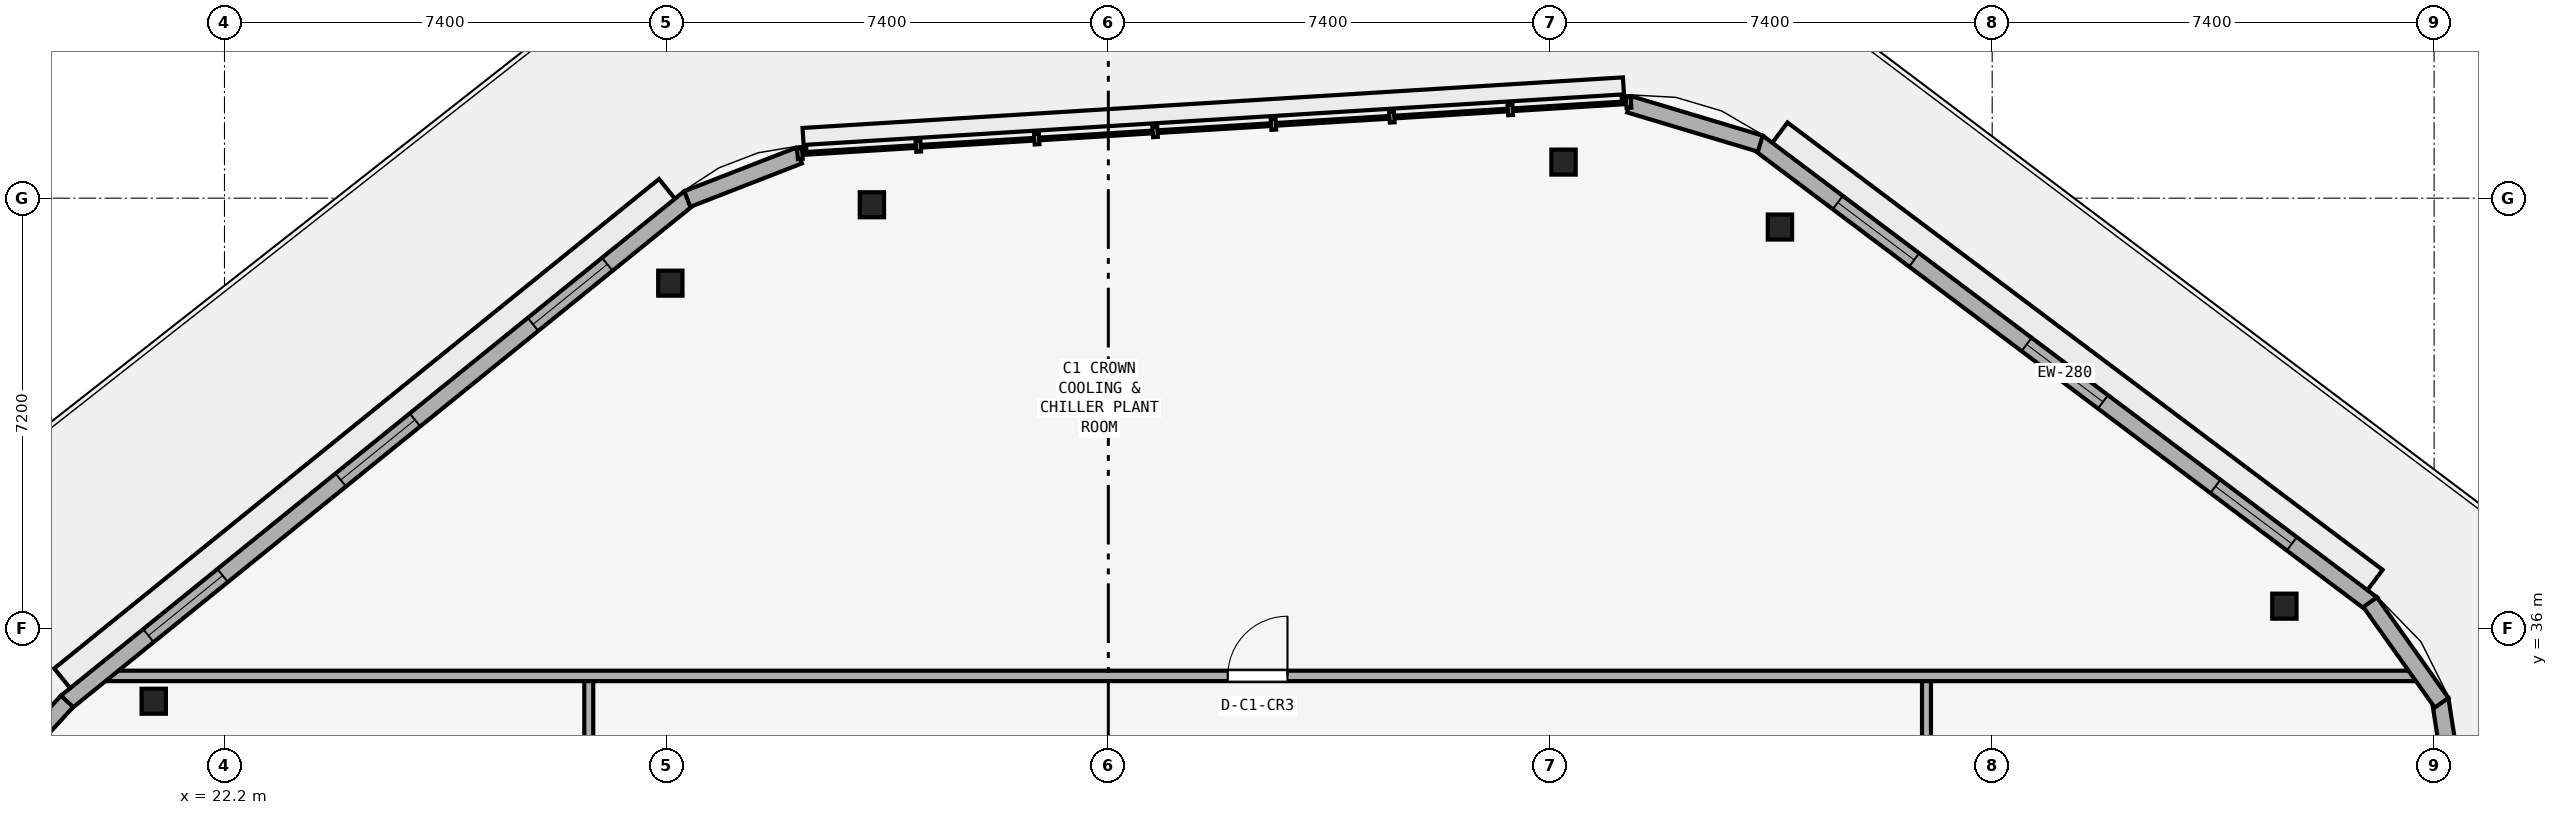
"""IFC4 building model, lengths in metres.
Left out: names, types, materials, properties, quantities, classifications, styles, units other than length and angle.
Written with IfcOpenShell. Run it as: python <this file> out.ifc"""

import sys

from ifc_helpers import new_model, si_unit, direction, frame, frame_2d, origin, origin_2d, place, context, subcontext, project, spatial, rectangle, i_section, extrude, element, fill, save


model = new_model("IFC4")
c1 = context("Model", 3, precision=1e-05, world=origin(), true_north=direction((0.0, 1.0)))
c2 = subcontext(c1, "Body", "Model", "MODEL_VIEW")
j1 = project(units=[si_unit("LENGTHUNIT", "METRE"), si_unit("PLANEANGLEUNIT", "RADIAN")], contexts=[c1])
p1 = place(None, origin())
s1 = spatial("IfcSite", under=j1, at=p1, CompositionType="ELEMENT")
p2 = place(p1, origin())
s2 = spatial("IfcBuilding", under=s1, at=p2, CompositionType="ELEMENT")
p3 = place(p2, frame((0.0, 0.0, 313.4)))
s3 = spatial("IfcBuildingStorey", under=s2, at=p3, CompositionType="ELEMENT", Elevation=313.4)
for number, where, z_axis, x_axis in (
    (1, (56.693, 36.368, 0.0), (0.0, 0.0, 1.0), (1.0, 0.0, 0.0)),
    (2, (48.246, 42.717, 0.0), (0.0, 0.0, 1.0), (1.0, 0.0, 0.0)),
    (3, (44.622, 43.804, 0.0), (0.0, 0.0, 1.0), (1.0, 0.0, 0.0)),
    (4, (33.041, 43.09, 0.0), (0.0, 0.0, 1.0), (1.0, 0.0, 0.0)),
    (5, (29.666, 41.777, 0.0), (0.0, 0.0, 1.0), (1.0, 0.0, 0.0)),
    (6, (21.016, 34.776, 0.0), (0.0, 0.0, 1.0), (1.0, 0.0, 0.0)),
):
    element("IfcColumn", number, at=place(p3, frame(where, z_axis=z_axis, x_axis=x_axis)), inside=s3, PredefinedType="COLUMN", context=c2, shape_type="SweptSolid", body=[
        extrude(i_section(OverallWidth=0.407, OverallDepth=0.419, WebThickness=0.031, FlangeThickness=0.049, at=origin_2d()), origin(), (0.0, 0.0, 1.0), 4.0),
    ])
p4 = place(p3, frame((50.7, 15.2, 0.0), z_axis=(0.0, 0.0, 1.0), x_axis=(0.0, 1.0, 0.0)))
e7 = element("IfcWall", 7, at=p4, inside=s3, PredefinedType="PARTITIONING", context=c2, shape_type="SweptSolid", body=[
    extrude(rectangle(XDim=20.0, YDim=0.15, at=frame_2d((10.0, 0.0))), origin(), (0.0, 0.0, 1.0), 3.72),
])
p5 = place(p4, frame((9.5, 0.0, 0.0)))
e8 = element("IfcOpeningElement", 8, at=p5, cuts=e7, PredefinedType="OPENING", context=c2, shape_type="SweptSolid", body=[
    extrude(rectangle(XDim=1.0, YDim=2.12, at=frame_2d((0.5, 1.06))), frame((0.0, 0.085, 0.0), z_axis=(0.0, -1.0, 0.0), x_axis=(1.0, 0.0, 0.0)), (0.0, 0.0, 1.0), 0.17),
])
p6 = place(p3, frame((28.3, 15.2, 0.0), z_axis=(0.0, 0.0, 1.0), x_axis=(0.0, 1.0, 0.0)))
e9 = element("IfcWall", 9, at=p6, inside=s3, PredefinedType="PARTITIONING", context=c2, shape_type="SweptSolid", body=[
    extrude(rectangle(XDim=20.0, YDim=0.15, at=frame_2d((10.0, 0.0))), origin(), (0.0, 0.0, 1.0), 3.72),
])
p7 = place(p6, frame((9.5, 0.0, 0.0)))
e10 = element("IfcOpeningElement", 10, at=p7, cuts=e9, PredefinedType="OPENING", context=c2, shape_type="SweptSolid", body=[
    extrude(rectangle(XDim=1.0, YDim=2.12, at=frame_2d((0.5, 1.06))), frame((0.0, 0.085, 0.0), z_axis=(0.0, -1.0, 0.0), x_axis=(1.0, 0.0, 0.0)), (0.0, 0.0, 1.0), 0.17),
])
p8 = place(p3, frame((20.01, 35.2, 0.0), z_axis=(0.0, 0.0, 1.0), x_axis=(1.0, 0.0, 0.0)))
e11 = element("IfcWall", 11, at=p8, inside=s3, PredefinedType="PARTITIONING", context=c2, shape_type="SweptSolid", body=[
    extrude(rectangle(XDim=39.04, YDim=0.175, at=frame_2d((19.52, 0.0))), origin(), (0.0, 0.0, 1.0), 3.103),
])
p9 = place(p8, frame((18.99, 0.0, 0.0)))
e12 = element("IfcOpeningElement", 12, at=p9, cuts=e11, PredefinedType="OPENING", context=c2, shape_type="SweptSolid", body=[
    extrude(rectangle(XDim=1.0, YDim=2.12, at=frame_2d((0.5, 1.06))), frame((0.0, 0.097, 0.0), z_axis=(0.0, -1.0, 0.0), x_axis=(1.0, 0.0, 0.0)), (0.0, 0.0, 1.0), 0.195),
])
p10 = place(p3, frame((58.159, 36.404, 0.0), z_axis=(0.0, 0.0, 1.0), x_axis=(-0.799362001769, 0.600849723415, 0.0)))
e13 = element("IfcWall", 13, at=p10, inside=s3, PredefinedType="STANDARD", context=c2, shape_type="SweptSolid", body=[
    extrude(rectangle(XDim=12.867, YDim=0.28, at=frame_2d((6.433, 0.0))), origin(), (0.0, 0.0, 1.0), 3.72),
])
p11 = place(p10, frame((1.678, 0.0, 0.9)))
e14 = element("IfcOpeningElement", 14, at=p11, cuts=e13, PredefinedType="OPENING", context=c2, shape_type="SweptSolid", body=[
    extrude(rectangle(XDim=1.6, YDim=1.45, at=frame_2d((0.8, 0.725))), frame((0.0, 0.15, 0.0), z_axis=(0.0, -1.0, 0.0), x_axis=(1.0, 0.0, 0.0)), (0.0, 0.0, 1.0), 0.3),
])
p12 = place(p10, frame((5.633, 0.0, 0.9)))
e15 = element("IfcOpeningElement", 15, at=p12, cuts=e13, PredefinedType="OPENING", context=c2, shape_type="SweptSolid", body=[
    extrude(rectangle(XDim=1.6, YDim=1.45, at=frame_2d((0.8, 0.725))), frame((0.0, 0.15, 0.0), z_axis=(0.0, -1.0, 0.0), x_axis=(1.0, 0.0, 0.0)), (0.0, 0.0, 1.0), 0.3),
])
p13 = place(p10, frame((9.589, 0.0, 0.9)))
e16 = element("IfcOpeningElement", 16, at=p13, cuts=e13, PredefinedType="OPENING", context=c2, shape_type="SweptSolid", body=[
    extrude(rectangle(XDim=1.6, YDim=1.45, at=frame_2d((0.8, 0.725))), frame((0.0, 0.15, 0.0), z_axis=(0.0, -1.0, 0.0), x_axis=(1.0, 0.0, 0.0)), (0.0, 0.0, 1.0), 0.3),
])
p14 = place(p3, frame((29.987, 43.208, 0.0), z_axis=(0.0, 0.0, 1.0), x_axis=(-0.777319383305, -0.629106172548, 0.0)))
e17 = element("IfcWall", 17, at=p14, inside=s3, PredefinedType="STANDARD", context=c2, shape_type="SweptSolid", body=[
    extrude(rectangle(XDim=13.428, YDim=0.28, at=frame_2d((6.714, 0.0))), origin(), (0.0, 0.0, 1.0), 3.72),
])
p15 = place(p14, frame((1.771, 0.0, 0.9)))
e18 = element("IfcOpeningElement", 18, at=p15, cuts=e17, PredefinedType="OPENING", context=c2, shape_type="SweptSolid", body=[
    extrude(rectangle(XDim=1.6, YDim=1.45, at=frame_2d((0.8, 0.725))), frame((0.0, 0.15, 0.0), z_axis=(0.0, -1.0, 0.0), x_axis=(1.0, 0.0, 0.0)), (0.0, 0.0, 1.0), 0.3),
])
p16 = place(p14, frame((5.914, 0.0, 0.9)))
e19 = element("IfcOpeningElement", 19, at=p16, cuts=e17, PredefinedType="OPENING", context=c2, shape_type="SweptSolid", body=[
    extrude(rectangle(XDim=1.6, YDim=1.45, at=frame_2d((0.8, 0.725))), frame((0.0, 0.15, 0.0), z_axis=(0.0, -1.0, 0.0), x_axis=(1.0, 0.0, 0.0)), (0.0, 0.0, 1.0), 0.3),
])
p17 = place(p14, frame((10.057, 0.0, 0.9)))
e20 = element("IfcOpeningElement", 20, at=p17, cuts=e17, PredefinedType="OPENING", context=c2, shape_type="SweptSolid", body=[
    extrude(rectangle(XDim=1.6, YDim=1.45, at=frame_2d((0.8, 0.725))), frame((0.0, 0.15, 0.0), z_axis=(0.0, -1.0, 0.0), x_axis=(1.0, 0.0, 0.0)), (0.0, 0.0, 1.0), 0.3),
])
p18 = place(p3, frame((59.452, 33.841, 0.0), z_axis=(0.0, 0.0, 1.0), x_axis=(-0.153890702538, 0.988087876493, 0.0)))
e21 = element("IfcWall", 21, at=p18, inside=s3, PredefinedType="STANDARD", context=c2, shape_type="SweptSolid", body=[
    extrude(rectangle(XDim=0.98, YDim=0.28, at=frame_2d((0.49, 0.0))), origin(), (0.0, 0.0, 1.0), 3.72),
])
p19 = place(p3, frame((59.325, 34.75, 0.0), z_axis=(0.0, 0.0, 1.0), x_axis=(-0.578944699304, 0.815366810183, 0.0)))
e22 = element("IfcWall", 22, at=p19, inside=s3, PredefinedType="STANDARD", context=c2, shape_type="SweptSolid", body=[
    extrude(rectangle(XDim=2.066, YDim=0.28, at=frame_2d((1.033, 0.0))), origin(), (0.0, 0.0, 1.0), 3.72),
])
p20 = place(p3, frame((47.917, 44.113, 0.0), z_axis=(0.0, 0.0, 1.0), x_axis=(-0.957835100655, 0.287318499149, 0.0)))
e23 = element("IfcWall", 23, at=p20, inside=s3, PredefinedType="STANDARD", context=c2, shape_type="SweptSolid", body=[
    extrude(rectangle(XDim=2.287, YDim=0.28, at=frame_2d((1.143, 0.0))), origin(), (0.0, 0.0, 1.0), 3.72),
])
p21 = place(p3, frame((31.819, 43.913, 0.0), z_axis=(0.0, 0.0, 1.0), x_axis=(-0.931977254785, -0.362516753494, 0.0)))
e24 = element("IfcWall", 24, at=p21, inside=s3, PredefinedType="STANDARD", context=c2, shape_type="SweptSolid", body=[
    extrude(rectangle(XDim=2.006, YDim=0.28, at=frame_2d((1.003, 0.0))), origin(), (0.0, 0.0, 1.0), 3.72),
])
p22 = place(p3, frame((19.564, 34.774, 0.0), z_axis=(0.0, 0.0, 1.0), x_axis=(-0.675845585144, -0.737043245028, 0.0)))
e25 = element("IfcWall", 25, at=p22, inside=s3, PredefinedType="STANDARD", context=c2, shape_type="SweptSolid", body=[
    extrude(rectangle(XDim=1.005, YDim=0.28, at=frame_2d((0.503, 0.0))), origin(), (0.0, 0.0, 1.0), 3.72),
])
p23 = place(p9, origin())
e26 = element("IfcDoor", 26, at=p23, inside=s3, OperationType="SINGLE_SWING_RIGHT", PredefinedType="DOOR", context=c2, shape_type="SweptSolid", body=[
    extrude(rectangle(XDim=1.0, YDim=2.12, at=frame_2d((0.5, 1.06))), frame((0.0, 0.025, 0.0), z_axis=(0.0, -1.0, 0.0), x_axis=(1.0, 0.0, 0.0)), (0.0, 0.0, 1.0), 0.05),
])
fill(e12, e26)
p24 = place(p11, origin())
e27 = element("IfcWindow", 27, at=p24, inside=s3, PartitioningType="SINGLE_PANEL", PredefinedType="WINDOW", context=c2, shape_type="SweptSolid", body=[
    extrude(rectangle(XDim=1.6, YDim=1.45, at=frame_2d((0.8, 0.725))), frame((0.0, 0.03, 0.0), z_axis=(0.0, -1.0, 0.0), x_axis=(1.0, 0.0, 0.0)), (0.0, 0.0, 1.0), 0.06),
])
fill(e14, e27)
p25 = place(p12, origin())
e28 = element("IfcWindow", 28, at=p25, inside=s3, PartitioningType="SINGLE_PANEL", PredefinedType="WINDOW", context=c2, shape_type="SweptSolid", body=[
    extrude(rectangle(XDim=1.6, YDim=1.45, at=frame_2d((0.8, 0.725))), frame((0.0, 0.03, 0.0), z_axis=(0.0, -1.0, 0.0), x_axis=(1.0, 0.0, 0.0)), (0.0, 0.0, 1.0), 0.06),
])
fill(e15, e28)
p26 = place(p13, origin())
e29 = element("IfcWindow", 29, at=p26, inside=s3, PartitioningType="SINGLE_PANEL", PredefinedType="WINDOW", context=c2, shape_type="SweptSolid", body=[
    extrude(rectangle(XDim=1.6, YDim=1.45, at=frame_2d((0.8, 0.725))), frame((0.0, 0.03, 0.0), z_axis=(0.0, -1.0, 0.0), x_axis=(1.0, 0.0, 0.0)), (0.0, 0.0, 1.0), 0.06),
])
fill(e16, e29)
p27 = place(p15, origin())
e30 = element("IfcWindow", 30, at=p27, inside=s3, PartitioningType="SINGLE_PANEL", PredefinedType="WINDOW", context=c2, shape_type="SweptSolid", body=[
    extrude(rectangle(XDim=1.6, YDim=1.45, at=frame_2d((0.8, 0.725))), frame((0.0, 0.03, 0.0), z_axis=(0.0, -1.0, 0.0), x_axis=(1.0, 0.0, 0.0)), (0.0, 0.0, 1.0), 0.06),
])
fill(e18, e30)
p28 = place(p16, origin())
e31 = element("IfcWindow", 31, at=p28, inside=s3, PartitioningType="SINGLE_PANEL", PredefinedType="WINDOW", context=c2, shape_type="SweptSolid", body=[
    extrude(rectangle(XDim=1.6, YDim=1.45, at=frame_2d((0.8, 0.725))), frame((0.0, 0.03, 0.0), z_axis=(0.0, -1.0, 0.0), x_axis=(1.0, 0.0, 0.0)), (0.0, 0.0, 1.0), 0.06),
])
fill(e19, e31)
p29 = place(p17, origin())
e32 = element("IfcWindow", 32, at=p29, inside=s3, PartitioningType="SINGLE_PANEL", PredefinedType="WINDOW", context=c2, shape_type="SweptSolid", body=[
    extrude(rectangle(XDim=1.6, YDim=1.45, at=frame_2d((0.8, 0.725))), frame((0.0, 0.03, 0.0), z_axis=(0.0, -1.0, 0.0), x_axis=(1.0, 0.0, 0.0)), (0.0, 0.0, 1.0), 0.06),
])
fill(e20, e32)
save(model, sys.argv[1])
